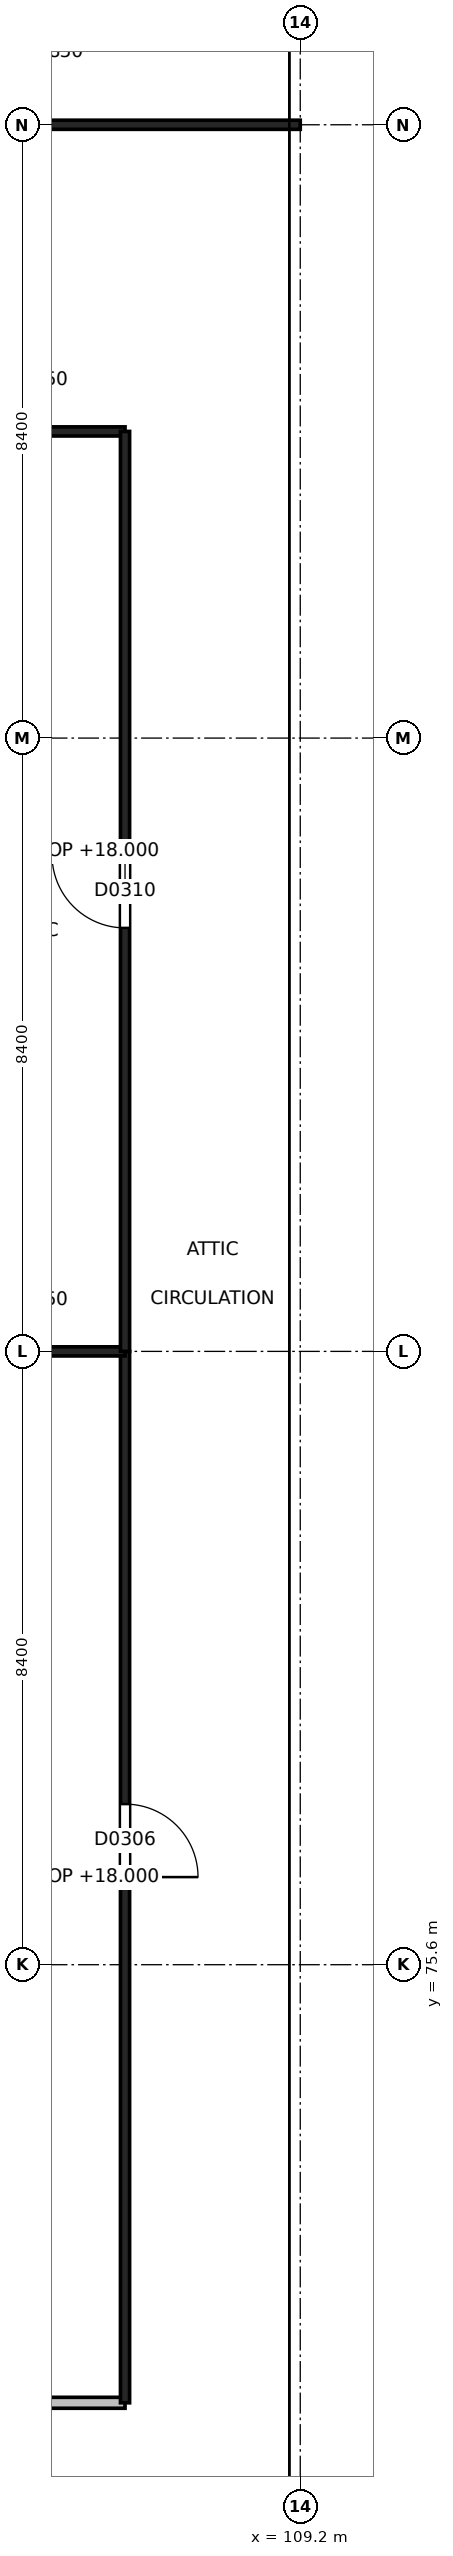
"""IFC4 building model, lengths in metres.
Left out: names, types, materials, properties, quantities, classifications, styles, units other than length and angle.
Written with IfcOpenShell. Run it as: python <this file> out.ifc"""

import sys

from ifc_helpers import new_model, si_unit, direction, frame, frame_2d, origin, place, context, subcontext, project, spatial, rectangle, extrude, element, fill, save


model = new_model("IFC4")
c1 = context("Model", 3, precision=1e-05, world=origin(), true_north=direction((0.0, 1.0)))
c2 = subcontext(c1, "Body", "Model", "MODEL_VIEW")
j1 = project(units=[si_unit("LENGTHUNIT", "METRE"), si_unit("PLANEANGLEUNIT", "RADIAN")], contexts=[c1])
p1 = place(None, origin())
s1 = spatial("IfcSite", under=j1, at=p1, CompositionType="ELEMENT")
p2 = place(p1, origin())
s2 = spatial("IfcBuilding", under=s1, at=p2, CompositionType="ELEMENT")
p3 = place(p2, frame((0.0, 0.0, 15.0)))
s3 = spatial("IfcBuildingStorey", under=s2, at=p3, CompositionType="ELEMENT", Elevation=15.0)
p4 = place(p3, frame((92.4, 69.6, 0.0), z_axis=(0.0, 0.0, 1.0), x_axis=(1.0, 0.0, 0.0)))
e1 = element("IfcWall", 1, at=p4, inside=s3, PredefinedType="PARTITIONING", context=c2, shape_type="SweptSolid", body=[
    extrude(rectangle(XDim=14.4, YDim=0.15, at=frame_2d((7.2, 0.0))), origin(), (0.0, 0.0, 1.0), 2.85),
])
p5 = place(p4, frame((0.25, 0.0, 0.0)))
e2 = element("IfcOpeningElement", 2, at=p5, cuts=e1, PredefinedType="OPENING", context=c2, shape_type="SweptSolid", body=[
    extrude(rectangle(XDim=1.0, YDim=2.2, at=frame_2d((0.5, 1.1))), frame((0.0, 0.075, 0.0), z_axis=(0.0, -1.0, 0.0), x_axis=(1.0, 0.0, 0.0)), (0.0, 0.0, 1.0), 0.15),
])
p6 = place(p3, frame((106.8, 69.6, 0.0), z_axis=(0.0, 0.0, 1.0), x_axis=(0.0, 1.0, 0.0)))
e3 = element("IfcWall", 3, at=p6, inside=s3, PredefinedType="PARTITIONING", context=c2, shape_type="SweptSolid", body=[
    extrude(rectangle(XDim=14.4, YDim=0.125, at=frame_2d((7.2, 0.0))), origin(), (0.0, 0.0, 1.0), 3.0),
])
p7 = place(p6, frame((7.2, 0.0, 0.0)))
e4 = element("IfcOpeningElement", 4, at=p7, cuts=e3, PredefinedType="OPENING", context=c2, shape_type="SweptSolid", body=[
    extrude(rectangle(XDim=1.0, YDim=2.2, at=frame_2d((0.5, 1.1))), frame((0.0, 0.062, 0.0), z_axis=(0.0, -1.0, 0.0), x_axis=(1.0, 0.0, 0.0)), (0.0, 0.0, 1.0), 0.125),
])
for number, where, z_axis, x_axis in (
    (5, (102.9, 84.0, 0.0), (0.0, 0.0, 1.0), (1.0, 0.0, 0.0)),
    (6, (102.9, 96.6, 0.0), (0.0, 0.0, 1.0), (1.0, 0.0, 0.0)),
):
    element("IfcWall", number, at=place(p3, frame(where, z_axis=z_axis, x_axis=x_axis)), inside=s3, PredefinedType="PARTITIONING", context=c2, shape_type="SweptSolid", body=[
        extrude(rectangle(XDim=3.9, YDim=0.125, at=frame_2d((1.95, 0.0))), origin(), (0.0, 0.0, 1.0), 2.85),
    ])
p8 = place(p3, frame((106.8, 84.0, 0.0), z_axis=(0.0, 0.0, 1.0), x_axis=(0.0, 1.0, 0.0)))
e7 = element("IfcWall", 7, at=p8, inside=s3, PredefinedType="PARTITIONING", context=c2, shape_type="SweptSolid", body=[
    extrude(rectangle(XDim=12.6, YDim=0.125, at=frame_2d((6.3, 0.0))), origin(), (0.0, 0.0, 1.0), 3.0),
])
p9 = place(p8, frame((5.8, 0.0, 0.0)))
e8 = element("IfcOpeningElement", 8, at=p9, cuts=e7, PredefinedType="OPENING", context=c2, shape_type="SweptSolid", body=[
    extrude(rectangle(XDim=1.0, YDim=2.1, at=frame_2d((0.5, 1.05))), frame((0.0, 0.062, 0.0), z_axis=(0.0, -1.0, 0.0), x_axis=(1.0, 0.0, 0.0)), (0.0, 0.0, 1.0), 0.125),
])
p10 = place(p3, frame((100.92, 100.8, 0.0), z_axis=(0.0, 0.0, 1.0), x_axis=(1.0, 0.0, 0.0)))
e9 = element("IfcWall", 9, at=p10, inside=s3, PredefinedType="PARTITIONING", context=c2, shape_type="SweptSolid", body=[
    extrude(rectangle(XDim=8.28, YDim=0.125, at=frame_2d((4.14, 0.0))), origin(), (0.0, 0.0, 1.0), 2.85),
])
p11 = place(p10, frame((3.58, 0.0, 0.0)))
e10 = element("IfcOpeningElement", 10, at=p11, cuts=e9, PredefinedType="OPENING", context=c2, shape_type="SweptSolid", body=[
    extrude(rectangle(XDim=1.0, YDim=2.2, at=frame_2d((0.5, 1.1))), frame((0.0, 0.062, 0.0), z_axis=(0.0, -1.0, 0.0), x_axis=(1.0, 0.0, 0.0)), (0.0, 0.0, 1.0), 0.125),
])
p12 = place(p7, origin())
e11 = element("IfcDoor", 11, at=p12, inside=s3, OperationType="SINGLE_SWING_LEFT", PredefinedType="DOOR", context=c2, shape_type="SweptSolid", body=[
    extrude(rectangle(XDim=1.0, YDim=2.2, at=frame_2d((0.5, 1.1))), frame((0.0, 0.025, 0.0), z_axis=(0.0, -1.0, 0.0), x_axis=(1.0, 0.0, 0.0)), (0.0, 0.0, 1.0), 0.05),
])
fill(e4, e11)
p13 = place(p9, origin())
e12 = element("IfcDoor", 12, at=p13, inside=s3, OperationType="SINGLE_SWING_RIGHT", PredefinedType="DOOR", context=c2, shape_type="SweptSolid", body=[
    extrude(rectangle(XDim=1.0, YDim=2.1, at=frame_2d((0.5, 1.05))), frame((0.0, 0.025, 0.0), z_axis=(0.0, -1.0, 0.0), x_axis=(1.0, 0.0, 0.0)), (0.0, 0.0, 1.0), 0.05),
])
fill(e8, e12)
save(model, sys.argv[1])
